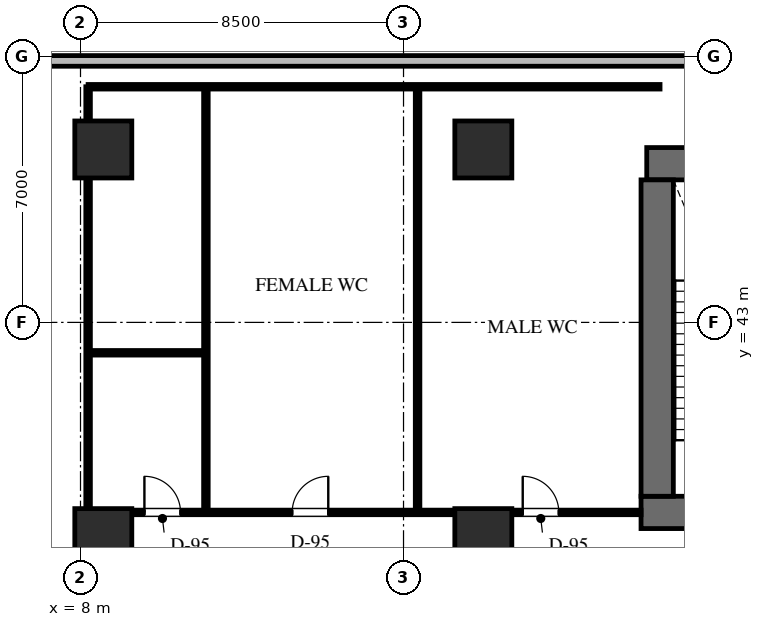
"""IFC4 building model, lengths in metres.
Left out: names, types, materials, properties, quantities, classifications, styles, units other than length and angle.
Written with IfcOpenShell. Run it as: python <this file> out.ifc"""

import sys

from ifc_helpers import new_model, si_unit, direction, frame, frame_2d, origin, origin_2d, place, context, subcontext, project, spatial, rectangle, extrude, element, fill, save


model = new_model("IFC4")
c1 = context("Model", 3, precision=1e-05, world=origin(), true_north=direction((0.0, 1.0)))
c2 = subcontext(c1, "Body", "Model", "MODEL_VIEW")
j1 = project(units=[si_unit("LENGTHUNIT", "METRE"), si_unit("PLANEANGLEUNIT", "RADIAN")], contexts=[c1])
p1 = place(None, origin())
s1 = spatial("IfcSite", under=j1, at=p1, CompositionType="ELEMENT")
p2 = place(p1, origin())
s2 = spatial("IfcBuilding", under=s1, at=p2, CompositionType="ELEMENT")
p3 = place(p2, frame((0.0, 0.0, 5.4)))
s3 = spatial("IfcBuildingStorey", under=s2, at=p3, CompositionType="ELEMENT", Elevation=5.4)
p4 = place(p3, frame((22.9, 47.175, 0.0), z_axis=(0.0, 0.0, 1.0), x_axis=(1.0, 0.0, 0.0)))
e1 = element("IfcWall", 1, at=p4, inside=s3, PredefinedType="SHEAR", context=c2, shape_type="SweptSolid", body=[
    extrude(rectangle(XDim=43.8, YDim=0.85, at=frame_2d((21.9, 0.0))), origin(), (0.0, 0.0, 1.0), 5.4),
])
p5 = place(p3, frame((22.75, 38.0, 0.0), z_axis=(0.0, 0.0, 1.0), x_axis=(1.0, 0.0, 0.0)))
e2 = element("IfcWall", 2, at=p5, inside=s3, PredefinedType="SHEAR", context=c2, shape_type="SweptSolid", body=[
    extrude(rectangle(XDim=4.3, YDim=0.85, at=frame_2d((2.15, 0.0))), origin(), (0.0, 0.0, 1.0), 5.4),
])
p6 = place(p5, frame((1.7, 0.0, 0.0)))
e3 = element("IfcOpeningElement", 3, at=p6, cuts=e2, PredefinedType="OPENING", context=c2, shape_type="SweptSolid", body=[
    extrude(rectangle(XDim=1.1, YDim=2.2, at=frame_2d((0.55, 1.1))), frame((0.0, 0.435, 0.0), z_axis=(0.0, -1.0, 0.0), x_axis=(1.0, 0.0, 0.0)), (0.0, 0.0, 1.0), 0.87),
])
p7 = place(p3, frame((23.175, 38.425, 0.0), z_axis=(0.0, 0.0, 1.0), x_axis=(0.0, 1.0, 0.0)))
e4 = element("IfcWall", 4, at=p7, inside=s3, PredefinedType="SHEAR", context=c2, shape_type="SweptSolid", body=[
    extrude(rectangle(XDim=8.325, YDim=0.85, at=frame_2d((4.163, 0.0))), origin(), (0.0, 0.0, 1.0), 5.4),
])
for number, where, z_axis, x_axis in (
    (5, (18.6, 37.35, 0.0), (0.0, 0.0, 1.0), (1.0, 0.0, 0.0)),
    (6, (18.6, 47.55, 0.0), (0.0, 0.0, 1.0), (1.0, 0.0, 0.0)),
    (7, (8.6, 37.35, 0.0), (0.0, 0.0, 1.0), (1.0, 0.0, 0.0)),
    (8, (8.6, 47.55, 0.0), (0.0, 0.0, 1.0), (1.0, 0.0, 0.0)),
):
    element("IfcColumn", number, at=place(p3, frame(where, z_axis=z_axis, x_axis=x_axis)), inside=s3, PredefinedType="COLUMN", context=c2, shape_type="SweptSolid", body=[
        extrude(rectangle(XDim=1.5, YDim=1.5, at=origin_2d()), origin(), (0.0, 0.0, 1.0), 5.4),
    ])
p8 = place(p3, frame((2.65, 49.88, 0.0), z_axis=(0.0, 0.0, 1.0), x_axis=(1.0, 0.0, 0.0)))
e9 = element("IfcWall", 9, at=p8, inside=s3, PredefinedType="STANDARD", context=c2, shape_type="SweptSolid", body=[
    extrude(rectangle(XDim=68.701, YDim=0.28, at=frame_2d((34.35, 0.0))), origin(), (0.0, 0.0, 1.0), 5.13),
])
p9 = place(p3, frame((8.2, 38.0, 0.0), z_axis=(0.0, 0.0, 1.0), x_axis=(1.0, 0.0, 0.0)))
e10 = element("IfcWall", 10, at=p9, inside=s3, PredefinedType="PARTITIONING", context=c2, shape_type="SweptSolid", body=[
    extrude(rectangle(XDim=14.55, YDim=0.12, at=frame_2d((7.275, 0.0))), origin(), (0.0, 0.0, 1.0), 4.182),
])
p10 = place(p9, frame((1.482, 0.0, 0.0)))
e11 = element("IfcOpeningElement", 11, at=p10, cuts=e10, PredefinedType="OPENING", context=c2, shape_type="SweptSolid", body=[
    extrude(rectangle(XDim=0.95, YDim=2.15, at=frame_2d((0.475, 1.075))), frame((0.0, 0.07, 0.0), z_axis=(0.0, -1.0, 0.0), x_axis=(1.0, 0.0, 0.0)), (0.0, 0.0, 1.0), 0.14),
])
p11 = place(p9, frame((5.37, 0.0, 0.0)))
e12 = element("IfcOpeningElement", 12, at=p11, cuts=e10, PredefinedType="OPENING", context=c2, shape_type="SweptSolid", body=[
    extrude(rectangle(XDim=0.95, YDim=2.15, at=frame_2d((0.475, 1.075))), frame((0.0, 0.07, 0.0), z_axis=(0.0, -1.0, 0.0), x_axis=(1.0, 0.0, 0.0)), (0.0, 0.0, 1.0), 0.14),
])
p12 = place(p9, frame((11.437, 0.0, 0.0)))
e13 = element("IfcOpeningElement", 13, at=p12, cuts=e10, PredefinedType="OPENING", context=c2, shape_type="SweptSolid", body=[
    extrude(rectangle(XDim=0.95, YDim=2.15, at=frame_2d((0.475, 1.075))), frame((0.0, 0.07, 0.0), z_axis=(0.0, -1.0, 0.0), x_axis=(1.0, 0.0, 0.0)), (0.0, 0.0, 1.0), 0.14),
])
p13 = place(p3, frame((8.2, 38.0, 0.0), z_axis=(0.0, 0.0, 1.0), x_axis=(0.0, 1.0, 0.0)))
e14 = element("IfcWall", 14, at=p13, inside=s3, PredefinedType="PARTITIONING", context=c2, shape_type="SweptSolid", body=[
    extrude(rectangle(XDim=11.2, YDim=0.12, at=frame_2d((5.6, 0.0))), origin(), (0.0, 0.0, 1.0), 5.13),
])
p14 = place(p3, frame((8.2, 49.2, 0.0), z_axis=(0.0, 0.0, 1.0), x_axis=(1.0, 0.0, 0.0)))
e15 = element("IfcWall", 15, at=p14, inside=s3, PredefinedType="PARTITIONING", context=c2, shape_type="SweptSolid", body=[
    extrude(rectangle(XDim=15.05, YDim=0.12, at=frame_2d((7.525, 0.0))), origin(), (0.0, 0.0, 1.0), 5.13),
])
for number, where, z_axis, x_axis in (
    (16, (11.3, 38.068, 0.0), (0.0, 0.0, 1.0), (0.0, 1.0, 0.0)),
    (17, (16.87, 38.068, 0.0), (0.0, 0.0, 1.0), (0.0, 1.0, 0.0)),
):
    element("IfcWall", number, at=place(p3, frame(where, z_axis=z_axis, x_axis=x_axis)), inside=s3, PredefinedType="PARTITIONING", context=c2, shape_type="SweptSolid", body=[
        extrude(rectangle(XDim=11.064, YDim=0.12, at=frame_2d((5.532, 0.0))), origin(), (0.0, 0.0, 1.0), 4.182),
    ])
p15 = place(p3, frame((8.268, 42.2, 0.0), z_axis=(0.0, 0.0, 1.0), x_axis=(1.0, 0.0, 0.0)))
e18 = element("IfcWall", 18, at=p15, inside=s3, PredefinedType="PARTITIONING", context=c2, shape_type="SweptSolid", body=[
    extrude(rectangle(XDim=2.964, YDim=0.12, at=frame_2d((1.482, 0.0))), origin(), (0.0, 0.0, 1.0), 4.182),
])
p16 = place(p10, origin())
e19 = element("IfcDoor", 19, at=p16, inside=s3, OperationType="SINGLE_SWING_LEFT", PredefinedType="DOOR", context=c2, shape_type="SweptSolid", body=[
    extrude(rectangle(XDim=0.95, YDim=2.15, at=frame_2d((0.475, 1.075))), frame((0.0, 0.025, 0.0), z_axis=(0.0, -1.0, 0.0), x_axis=(1.0, 0.0, 0.0)), (0.0, 0.0, 1.0), 0.05),
])
fill(e11, e19)
p17 = place(p11, origin())
e20 = element("IfcDoor", 20, at=p17, inside=s3, OperationType="SINGLE_SWING_RIGHT", PredefinedType="DOOR", context=c2, shape_type="SweptSolid", body=[
    extrude(rectangle(XDim=0.95, YDim=2.15, at=frame_2d((0.475, 1.075))), frame((0.0, 0.025, 0.0), z_axis=(0.0, -1.0, 0.0), x_axis=(1.0, 0.0, 0.0)), (0.0, 0.0, 1.0), 0.05),
])
fill(e12, e20)
p18 = place(p12, origin())
e21 = element("IfcDoor", 21, at=p18, inside=s3, OperationType="SINGLE_SWING_LEFT", PredefinedType="DOOR", context=c2, shape_type="SweptSolid", body=[
    extrude(rectangle(XDim=0.95, YDim=2.15, at=frame_2d((0.475, 1.075))), frame((0.0, 0.025, 0.0), z_axis=(0.0, -1.0, 0.0), x_axis=(1.0, 0.0, 0.0)), (0.0, 0.0, 1.0), 0.05),
])
fill(e13, e21)
save(model, sys.argv[1])
